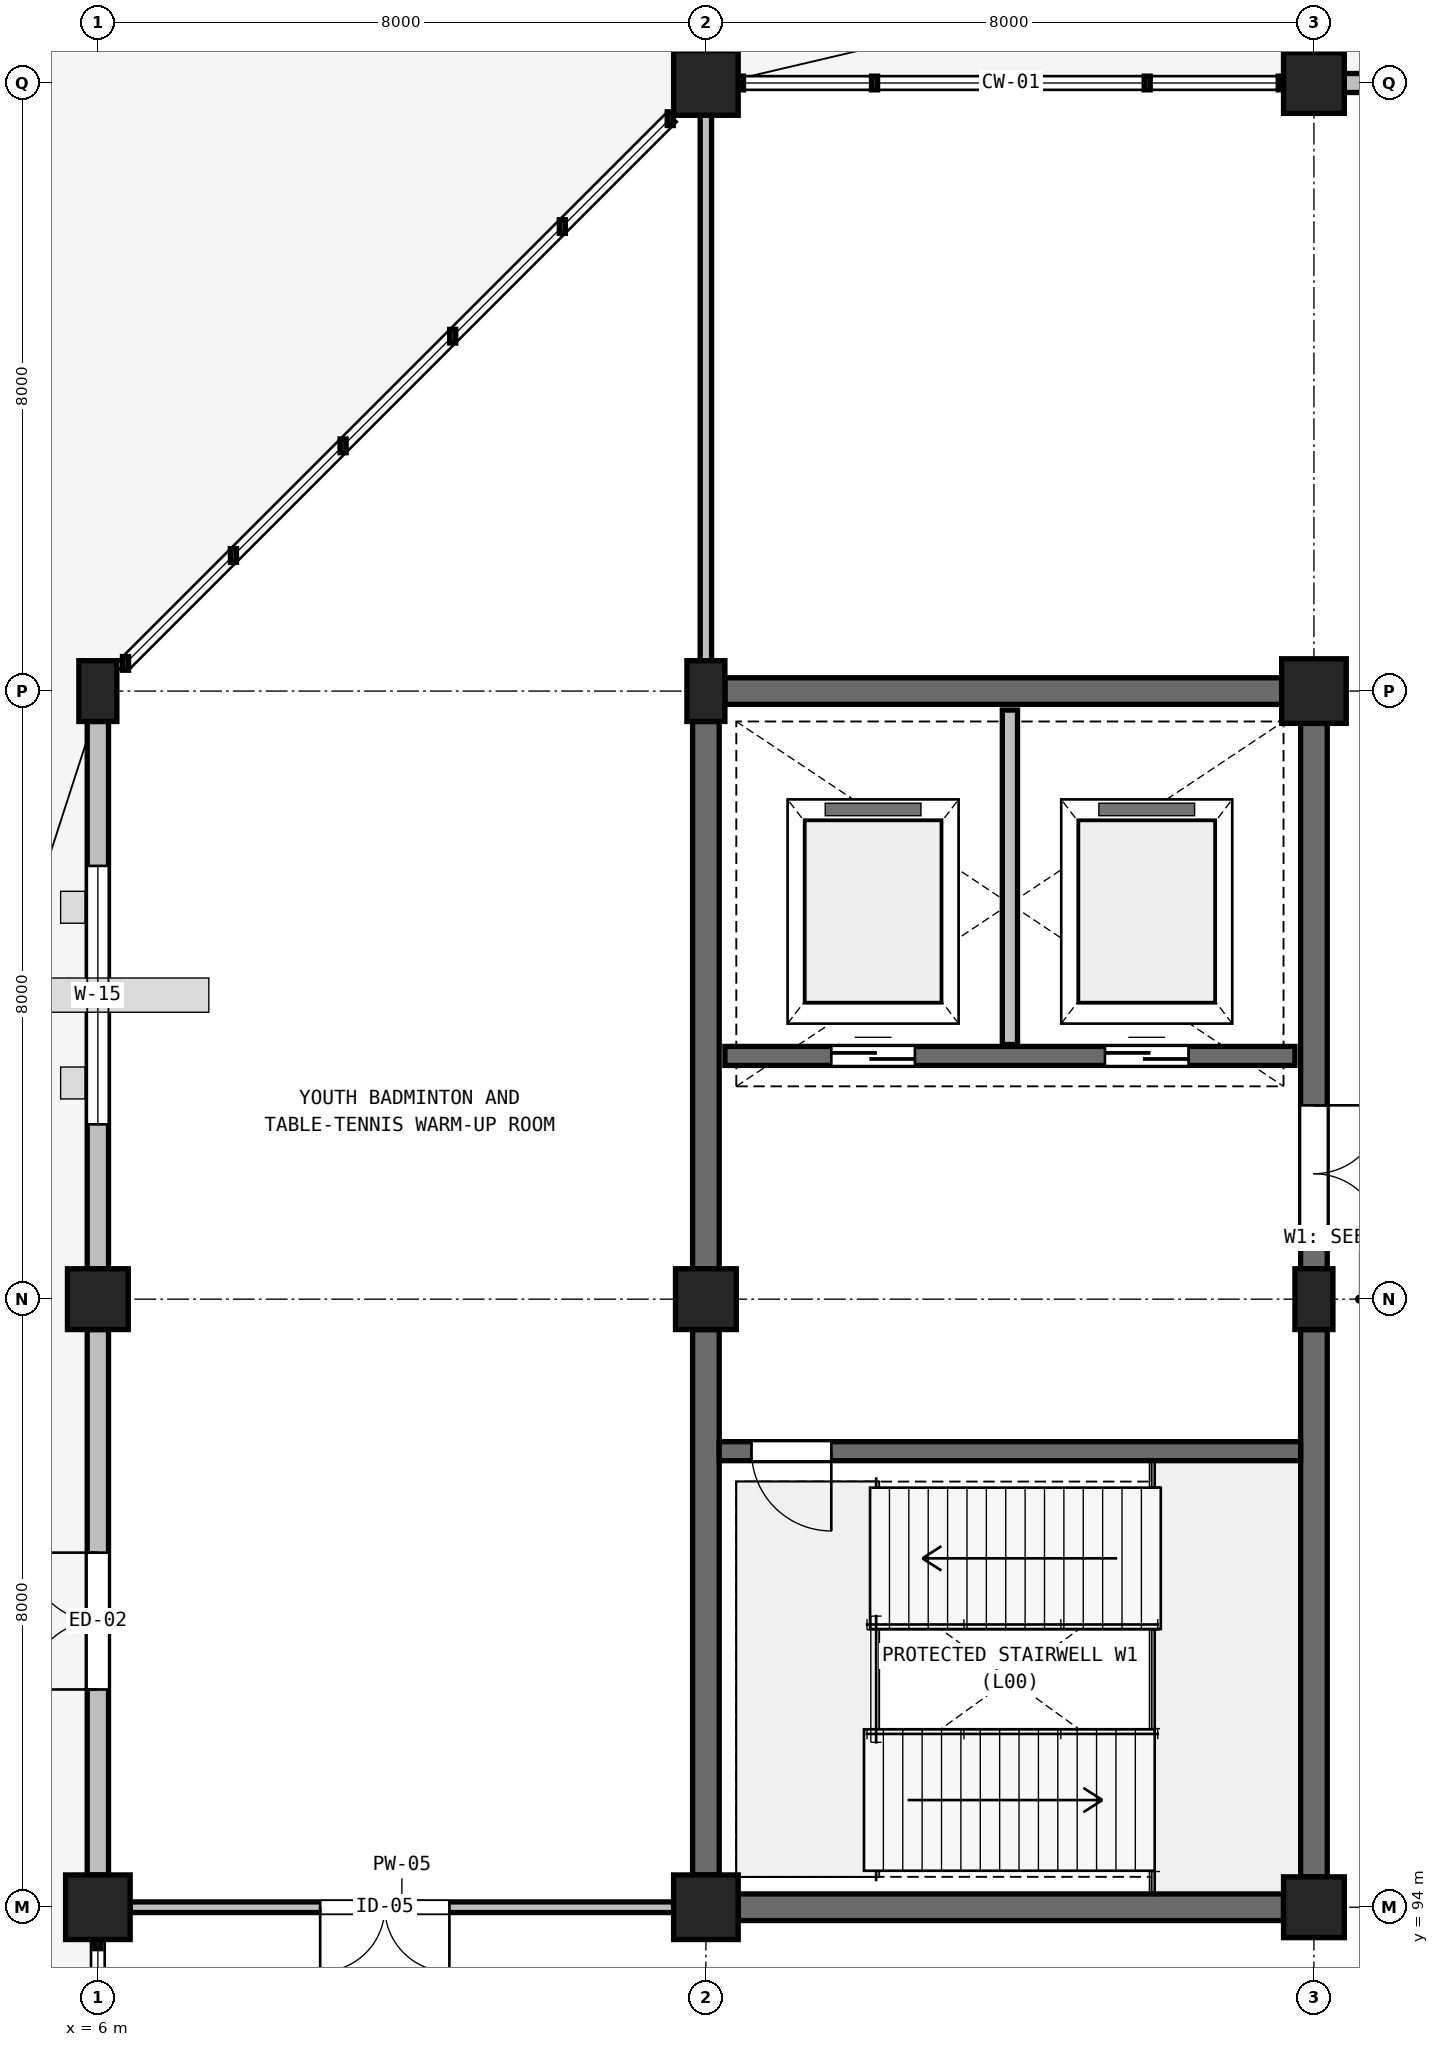
"""IFC4 building model, lengths in metres.
Left out: names, types, materials, properties, quantities, classifications, styles, units other than length and angle.
Written with IfcOpenShell. Run it as: python <this file> out.ifc"""

import sys

from ifc_helpers import new_model, si_unit, direction, frame, frame_2d, origin, origin_2d, place, context, subcontext, project, spatial, rectangle, extrude, element, fill, save


model = new_model("IFC4")
c1 = context("Model", 3, precision=1e-05, world=origin(), true_north=direction((0.0, 1.0)))
c2 = subcontext(c1, "Body", "Model", "MODEL_VIEW")
j1 = project(units=[si_unit("LENGTHUNIT", "METRE"), si_unit("PLANEANGLEUNIT", "RADIAN")], contexts=[c1])
p1 = place(None, origin())
s1 = spatial("IfcSite", under=j1, at=p1, CompositionType="ELEMENT")
p2 = place(p1, origin())
s2 = spatial("IfcBuilding", under=s1, at=p2, CompositionType="ELEMENT")
p3 = place(p2, origin())
s3 = spatial("IfcBuildingStorey", under=s2, at=p3, CompositionType="ELEMENT", Elevation=0.0)
p4 = place(p3, frame((6.0, 94.0, 0.0), z_axis=(0.0, 0.0, 1.0), x_axis=(1.0, 0.0, 0.0)))
e1 = element("IfcColumn", 1, at=p4, inside=s3, PredefinedType="COLUMN", context=c2, shape_type="SweptSolid", body=[
    extrude(rectangle(XDim=0.85, YDim=0.85, at=origin_2d()), origin(), (0.0, 0.0, 1.0), 5.4),
])
p5 = place(p3, frame((6.0, 102.0, 0.0), z_axis=(0.0, 0.0, 1.0), x_axis=(1.0, 0.0, 0.0)))
e2 = element("IfcColumn", 2, at=p5, inside=s3, PredefinedType="COLUMN", context=c2, shape_type="SweptSolid", body=[
    extrude(rectangle(XDim=0.8, YDim=0.8, at=origin_2d()), origin(), (0.0, 0.0, 1.0), 5.4),
])
p6 = place(p3, frame((6.0, 110.0, 0.0), z_axis=(0.0, 0.0, 1.0), x_axis=(1.0, 0.0, 0.0)))
e3 = element("IfcColumn", 3, at=p6, inside=s3, PredefinedType="COLUMN", context=c2, shape_type="SweptSolid", body=[
    extrude(rectangle(XDim=0.5, YDim=0.8, at=origin_2d()), origin(), (0.0, 0.0, 1.0), 5.4),
])
p7 = place(p3, frame((14.0, 94.0, 0.0), z_axis=(0.0, 0.0, 1.0), x_axis=(1.0, 0.0, 0.0)))
e4 = element("IfcColumn", 4, at=p7, inside=s3, PredefinedType="COLUMN", context=c2, shape_type="SweptSolid", body=[
    extrude(rectangle(XDim=0.85, YDim=0.85, at=origin_2d()), origin(), (0.0, 0.0, 1.0), 5.4),
])
p8 = place(p3, frame((14.0, 102.0, 0.0), z_axis=(0.0, 0.0, 1.0), x_axis=(1.0, 0.0, 0.0)))
e5 = element("IfcColumn", 5, at=p8, inside=s3, PredefinedType="COLUMN", context=c2, shape_type="SweptSolid", body=[
    extrude(rectangle(XDim=0.8, YDim=0.8, at=origin_2d()), origin(), (0.0, 0.0, 1.0), 5.4),
])
p9 = place(p3, frame((14.0, 110.0, 0.0), z_axis=(0.0, 0.0, 1.0), x_axis=(1.0, 0.0, 0.0)))
e6 = element("IfcColumn", 6, at=p9, inside=s3, PredefinedType="COLUMN", context=c2, shape_type="SweptSolid", body=[
    extrude(rectangle(XDim=0.5, YDim=0.8, at=origin_2d()), origin(), (0.0, 0.0, 1.0), 5.4),
])
p10 = place(p3, frame((14.0, 118.0, 0.0), z_axis=(0.0, 0.0, 1.0), x_axis=(1.0, 0.0, 0.0)))
e7 = element("IfcColumn", 7, at=p10, inside=s3, PredefinedType="COLUMN", context=c2, shape_type="SweptSolid", body=[
    extrude(rectangle(XDim=0.85, YDim=0.85, at=origin_2d()), origin(), (0.0, 0.0, 1.0), 5.4),
])
p11 = place(p3, frame((22.0, 94.0, 0.0), z_axis=(0.0, 0.0, 1.0), x_axis=(1.0, 0.0, 0.0)))
e8 = element("IfcColumn", 8, at=p11, inside=s3, PredefinedType="COLUMN", context=c2, shape_type="SweptSolid", body=[
    extrude(rectangle(XDim=0.8, YDim=0.8, at=origin_2d()), origin(), (0.0, 0.0, 1.0), 5.4),
])
p12 = place(p3, frame((22.0, 102.0, 0.0), z_axis=(0.0, 0.0, 1.0), x_axis=(1.0, 0.0, 0.0)))
e9 = element("IfcColumn", 9, at=p12, inside=s3, PredefinedType="COLUMN", context=c2, shape_type="SweptSolid", body=[
    extrude(rectangle(XDim=0.5, YDim=0.8, at=origin_2d()), origin(), (0.0, 0.0, 1.0), 5.4),
])
p13 = place(p3, frame((22.0, 110.0, 0.0), z_axis=(0.0, 0.0, 1.0), x_axis=(1.0, 0.0, 0.0)))
e10 = element("IfcColumn", 10, at=p13, inside=s3, PredefinedType="COLUMN", context=c2, shape_type="SweptSolid", body=[
    extrude(rectangle(XDim=0.85, YDim=0.85, at=origin_2d()), origin(), (0.0, 0.0, 1.0), 5.4),
])
p14 = place(p3, frame((22.0, 118.0, 0.0), z_axis=(0.0, 0.0, 1.0), x_axis=(1.0, 0.0, 0.0)))
e11 = element("IfcColumn", 11, at=p14, inside=s3, PredefinedType="COLUMN", context=c2, shape_type="SweptSolid", body=[
    extrude(rectangle(XDim=0.8, YDim=0.8, at=origin_2d()), origin(), (0.0, 0.0, 1.0), 5.4),
])
p15 = place(p3, frame((22.4, 118.0, 0.0), z_axis=(0.0, 0.0, 1.0), x_axis=(1.0, 0.0, 0.0)))
e12 = element("IfcWall", 12, at=p15, inside=s3, PredefinedType="SOLIDWALL", context=c2, shape_type="SweptSolid", body=[
    extrude(rectangle(XDim=7.35, YDim=0.25, at=frame_2d((3.675, 0.0))), origin(), (0.0, 0.0, 1.0), 4.36),
])
p16 = place(p15, frame((0.85, 0.0, 1.5)))
e13 = element("IfcOpeningElement", 13, at=p16, cuts=e12, PredefinedType="OPENING", context=c2, shape_type="SweptSolid", body=[
    extrude(rectangle(XDim=0.9, YDim=1.2, at=frame_2d((0.45, 0.6))), frame((0.0, 0.135, 0.0), z_axis=(0.0, -1.0, 0.0), x_axis=(1.0, 0.0, 0.0)), (0.0, 0.0, 1.0), 0.27),
])
p17 = place(p15, frame((5.45, 0.0, 1.05)))
e14 = element("IfcOpeningElement", 14, at=p17, cuts=e12, PredefinedType="OPENING", context=c2, shape_type="SweptSolid", body=[
    extrude(rectangle(XDim=0.95, YDim=1.65, at=frame_2d((0.475, 0.825))), frame((0.0, 0.135, 0.0), z_axis=(0.0, -1.0, 0.0), x_axis=(1.0, 0.0, 0.0)), (0.0, 0.0, 1.0), 0.27),
])
p18 = place(p3, frame((6.0, 94.425, 0.0), z_axis=(0.0, 0.0, 1.0), x_axis=(0.0, 1.0, 0.0)))
e15 = element("IfcWall", 15, at=p18, inside=s3, PredefinedType="SOLIDWALL", context=c2, shape_type="SweptSolid", body=[
    extrude(rectangle(XDim=7.175, YDim=0.28, at=frame_2d((3.587, 0.0))), origin(), (0.0, 0.0, 1.0), 4.42),
])
p19 = place(p18, frame((2.44, 0.0, 0.0)))
e16 = element("IfcOpeningElement", 16, at=p19, cuts=e15, PredefinedType="OPENING", context=c2, shape_type="SweptSolid", body=[
    extrude(rectangle(XDim=1.8, YDim=2.3, at=frame_2d((0.9, 1.15))), frame((0.0, 0.15, 0.0), z_axis=(0.0, -1.0, 0.0), x_axis=(1.0, 0.0, 0.0)), (0.0, 0.0, 1.0), 0.3),
])
p20 = place(p3, frame((6.0, 102.4, 0.0), z_axis=(0.0, 0.0, 1.0), x_axis=(0.0, 1.0, 0.0)))
e17 = element("IfcWall", 17, at=p20, inside=s3, PredefinedType="SOLIDWALL", context=c2, shape_type="SweptSolid", body=[
    extrude(rectangle(XDim=7.2, YDim=0.28, at=frame_2d((3.6, 0.0))), origin(), (0.0, 0.0, 1.0), 4.36),
])
p21 = place(p20, frame((1.9, 0.0, 1.1)))
e18 = element("IfcOpeningElement", 18, at=p21, cuts=e17, PredefinedType="OPENING", context=c2, shape_type="SweptSolid", body=[
    extrude(rectangle(XDim=3.4, YDim=1.6, at=frame_2d((1.7, 0.8))), frame((0.0, 0.15, 0.0), z_axis=(0.0, -1.0, 0.0), x_axis=(1.0, 0.0, 0.0)), (0.0, 0.0, 1.0), 0.3),
])
p22 = place(p3, frame((14.425, 94.0, 0.0), z_axis=(0.0, 0.0, 1.0), x_axis=(1.0, 0.0, 0.0)))
e19 = element("IfcWall", 19, at=p22, inside=s3, PredefinedType="SHEAR", context=c2, shape_type="SweptSolid", body=[
    extrude(rectangle(XDim=7.175, YDim=0.35, at=frame_2d((3.587, 0.0))), origin(), (0.0, 0.0, 1.0), 5.18),
])
p23 = place(p3, frame((14.25, 110.0, 0.0), z_axis=(0.0, 0.0, 1.0), x_axis=(1.0, 0.0, 0.0)))
e20 = element("IfcWall", 20, at=p23, inside=s3, PredefinedType="SHEAR", context=c2, shape_type="SweptSolid", body=[
    extrude(rectangle(XDim=7.325, YDim=0.35, at=frame_2d((3.663, 0.0))), origin(), (0.0, 0.0, 1.0), 5.18),
])
p24 = place(p3, frame((14.0, 94.425, 0.0), z_axis=(0.0, 0.0, 1.0), x_axis=(0.0, 1.0, 0.0)))
e21 = element("IfcWall", 21, at=p24, inside=s3, PredefinedType="SHEAR", context=c2, shape_type="SweptSolid", body=[
    extrude(rectangle(XDim=7.175, YDim=0.35, at=frame_2d((3.587, 0.0))), origin(), (0.0, 0.0, 1.0), 5.18),
])
for number, where, z_axis, x_axis in (
    (22, (14.0, 102.4, 0.0), (0.0, 0.0, 1.0), (0.0, 1.0, 0.0)),
    (23, (22.0, 94.4, 0.0), (0.0, 0.0, 1.0), (0.0, 1.0, 0.0)),
):
    element("IfcWall", number, at=place(p3, frame(where, z_axis=z_axis, x_axis=x_axis)), inside=s3, PredefinedType="SHEAR", context=c2, shape_type="SweptSolid", body=[
        extrude(rectangle(XDim=7.2, YDim=0.35, at=frame_2d((3.6, 0.0))), origin(), (0.0, 0.0, 1.0), 5.18),
    ])
p25 = place(p3, frame((22.0, 102.4, 0.0), z_axis=(0.0, 0.0, 1.0), x_axis=(0.0, 1.0, 0.0)))
e24 = element("IfcWall", 24, at=p25, inside=s3, PredefinedType="SHEAR", context=c2, shape_type="SweptSolid", body=[
    extrude(rectangle(XDim=7.175, YDim=0.35, at=frame_2d((3.587, 0.0))), origin(), (0.0, 0.0, 1.0), 5.18),
])
p26 = place(p25, frame((0.35, 0.0, 0.0)))
e25 = element("IfcOpeningElement", 25, at=p26, cuts=e24, PredefinedType="OPENING", context=c2, shape_type="SweptSolid", body=[
    extrude(rectangle(XDim=1.8, YDim=2.2, at=frame_2d((0.9, 1.1))), frame((0.0, 0.185, 0.0), z_axis=(0.0, -1.0, 0.0), x_axis=(1.0, 0.0, 0.0)), (0.0, 0.0, 1.0), 0.37),
])
p27 = place(p3, frame((14.175, 100.0, 0.0), z_axis=(0.0, 0.0, 1.0), x_axis=(1.0, 0.0, 0.0)))
e26 = element("IfcWall", 26, at=p27, inside=s3, PredefinedType="SOLIDWALL", context=c2, shape_type="SweptSolid", body=[
    extrude(rectangle(XDim=7.65, YDim=0.25, at=frame_2d((3.825, 0.0))), origin(), (0.0, 0.0, 1.0), 5.18),
])
p28 = place(p27, frame((0.425, 0.0, 0.0)))
e27 = element("IfcOpeningElement", 27, at=p28, cuts=e26, PredefinedType="OPENING", context=c2, shape_type="SweptSolid", body=[
    extrude(rectangle(XDim=1.05, YDim=2.2, at=frame_2d((0.525, 1.1))), frame((0.0, 0.135, 0.0), z_axis=(0.0, -1.0, 0.0), x_axis=(1.0, 0.0, 0.0)), (0.0, 0.0, 1.0), 0.27),
])
p29 = place(p3, frame((14.25, 105.2, 0.0), z_axis=(0.0, 0.0, 1.0), x_axis=(1.0, 0.0, 0.0)))
e28 = element("IfcWall", 28, at=p29, inside=s3, PredefinedType="SOLIDWALL", context=c2, shape_type="SweptSolid", body=[
    extrude(rectangle(XDim=7.5, YDim=0.25, at=frame_2d((3.75, 0.0))), origin(), (0.0, 0.0, 1.0), 5.18),
])
p30 = place(p29, frame((1.4, 0.0, 0.0)))
e29 = element("IfcOpeningElement", 29, at=p30, cuts=e28, PredefinedType="OPENING", context=c2, shape_type="SweptSolid", body=[
    extrude(rectangle(XDim=1.1, YDim=2.2, at=frame_2d((0.55, 1.1))), frame((0.0, 0.135, 0.0), z_axis=(0.0, -1.0, 0.0), x_axis=(1.0, 0.0, 0.0)), (0.0, 0.0, 1.0), 0.27),
])
p31 = place(p29, frame((5.0, 0.0, 0.0)))
e30 = element("IfcOpeningElement", 30, at=p31, cuts=e28, PredefinedType="OPENING", context=c2, shape_type="SweptSolid", body=[
    extrude(rectangle(XDim=1.1, YDim=2.2, at=frame_2d((0.55, 1.1))), frame((0.0, 0.135, 0.0), z_axis=(0.0, -1.0, 0.0), x_axis=(1.0, 0.0, 0.0)), (0.0, 0.0, 1.0), 0.27),
])
p32 = place(p3, frame((18.0, 105.35, 0.0), z_axis=(0.0, 0.0, 1.0), x_axis=(0.0, 1.0, 0.0)))
e31 = element("IfcWall", 31, at=p32, inside=s3, PredefinedType="PARTITIONING", context=c2, shape_type="SweptSolid", body=[
    extrude(rectangle(XDim=4.4, YDim=0.2, at=frame_2d((2.2, 0.0))), origin(), (0.0, 0.0, 1.0), 5.1),
])
p33 = place(p3, frame((6.425, 94.0, 0.0), z_axis=(0.0, 0.0, 1.0), x_axis=(1.0, 0.0, 0.0)))
e32 = element("IfcWall", 32, at=p33, inside=s3, PredefinedType="PARTITIONING", context=c2, shape_type="SweptSolid", body=[
    extrude(rectangle(XDim=7.15, YDim=0.14, at=frame_2d((3.575, 0.0))), origin(), (0.0, 0.0, 1.0), 4.04),
])
p34 = place(p33, frame((2.5, 0.0, 0.0)))
e33 = element("IfcOpeningElement", 33, at=p34, cuts=e32, PredefinedType="OPENING", context=c2, shape_type="SweptSolid", body=[
    extrude(rectangle(XDim=1.7, YDim=2.25, at=frame_2d((0.85, 1.125))), frame((0.0, 0.08, 0.0), z_axis=(0.0, -1.0, 0.0), x_axis=(1.0, 0.0, 0.0)), (0.0, 0.0, 1.0), 0.16),
])
p35 = place(p3, frame((14.0, 110.4, 0.0), z_axis=(0.0, 0.0, 1.0), x_axis=(0.0, 1.0, 0.0)))
e34 = element("IfcWall", 34, at=p35, inside=s3, PredefinedType="PARTITIONING", context=c2, shape_type="SweptSolid", body=[
    extrude(rectangle(XDim=7.175, YDim=0.15, at=frame_2d((3.587, 0.0))), origin(), (0.0, 0.0, 1.0), 4.64),
])
p36 = place(p19, origin())
e35 = element("IfcDoor", 35, at=p36, inside=s3, OperationType="DOUBLE_DOOR_SINGLE_SWING", PredefinedType="DOOR", context=c2, shape_type="SweptSolid", body=[
    extrude(rectangle(XDim=1.8, YDim=2.3, at=frame_2d((0.9, 1.15))), frame((0.0, 0.025, 0.0), z_axis=(0.0, -1.0, 0.0), x_axis=(1.0, 0.0, 0.0)), (0.0, 0.0, 1.0), 0.05),
])
fill(e16, e35)
p37 = place(p21, origin())
e36 = element("IfcWindow", 36, at=p37, inside=s3, PartitioningType="SINGLE_PANEL", PredefinedType="WINDOW", context=c2, shape_type="SweptSolid", body=[
    extrude(rectangle(XDim=3.4, YDim=1.6, at=frame_2d((1.7, 0.8))), frame((0.0, 0.03, 0.0), z_axis=(0.0, -1.0, 0.0), x_axis=(1.0, 0.0, 0.0)), (0.0, 0.0, 1.0), 0.06),
])
fill(e18, e36)
p38 = place(p26, frame((1.8, 0.0, 0.0), z_axis=(0.0, 0.0, 1.0), x_axis=(-1.0, 0.0, 0.0)))
e37 = element("IfcDoor", 37, at=p38, inside=s3, OperationType="DOUBLE_DOOR_SINGLE_SWING", PredefinedType="DOOR", context=c2, shape_type="SweptSolid", body=[
    extrude(rectangle(XDim=1.8, YDim=2.2, at=frame_2d((0.9, 1.1))), frame((0.0, 0.025, 0.0), z_axis=(0.0, -1.0, 0.0), x_axis=(1.0, 0.0, 0.0)), (0.0, 0.0, 1.0), 0.05),
])
fill(e25, e37)
p39 = place(p28, frame((1.05, 0.0, 0.0), z_axis=(0.0, 0.0, 1.0), x_axis=(-1.0, 0.0, 0.0)))
e38 = element("IfcDoor", 38, at=p39, inside=s3, OperationType="SINGLE_SWING_RIGHT", PredefinedType="DOOR", context=c2, shape_type="SweptSolid", body=[
    extrude(rectangle(XDim=1.05, YDim=2.2, at=frame_2d((0.525, 1.1))), frame((0.0, 0.025, 0.0), z_axis=(0.0, -1.0, 0.0), x_axis=(1.0, 0.0, 0.0)), (0.0, 0.0, 1.0), 0.05),
])
fill(e27, e38)
p40 = place(p30, origin())
e39 = element("IfcDoor", 39, at=p40, inside=s3, OperationType="DOUBLE_DOOR_SLIDING", PredefinedType="DOOR", context=c2, shape_type="SweptSolid", body=[
    extrude(rectangle(XDim=1.1, YDim=2.2, at=frame_2d((0.55, 1.1))), frame((0.0, 0.025, 0.0), z_axis=(0.0, -1.0, 0.0), x_axis=(1.0, 0.0, 0.0)), (0.0, 0.0, 1.0), 0.05),
])
fill(e29, e39)
p41 = place(p31, origin())
e40 = element("IfcDoor", 40, at=p41, inside=s3, OperationType="DOUBLE_DOOR_SLIDING", PredefinedType="DOOR", context=c2, shape_type="SweptSolid", body=[
    extrude(rectangle(XDim=1.1, YDim=2.2, at=frame_2d((0.55, 1.1))), frame((0.0, 0.025, 0.0), z_axis=(0.0, -1.0, 0.0), x_axis=(1.0, 0.0, 0.0)), (0.0, 0.0, 1.0), 0.05),
])
fill(e30, e40)
p42 = place(p34, frame((1.7, 0.0, 0.0), z_axis=(0.0, 0.0, 1.0), x_axis=(-1.0, 0.0, 0.0)))
e41 = element("IfcDoor", 41, at=p42, inside=s3, OperationType="DOUBLE_DOOR_SINGLE_SWING", PredefinedType="DOOR", context=c2, shape_type="SweptSolid", body=[
    extrude(rectangle(XDim=1.7, YDim=2.25, at=frame_2d((0.85, 1.125))), frame((0.0, 0.025, 0.0), z_axis=(0.0, -1.0, 0.0), x_axis=(1.0, 0.0, 0.0)), (0.0, 0.0, 1.0), 0.05),
])
fill(e33, e41)
save(model, sys.argv[1])
